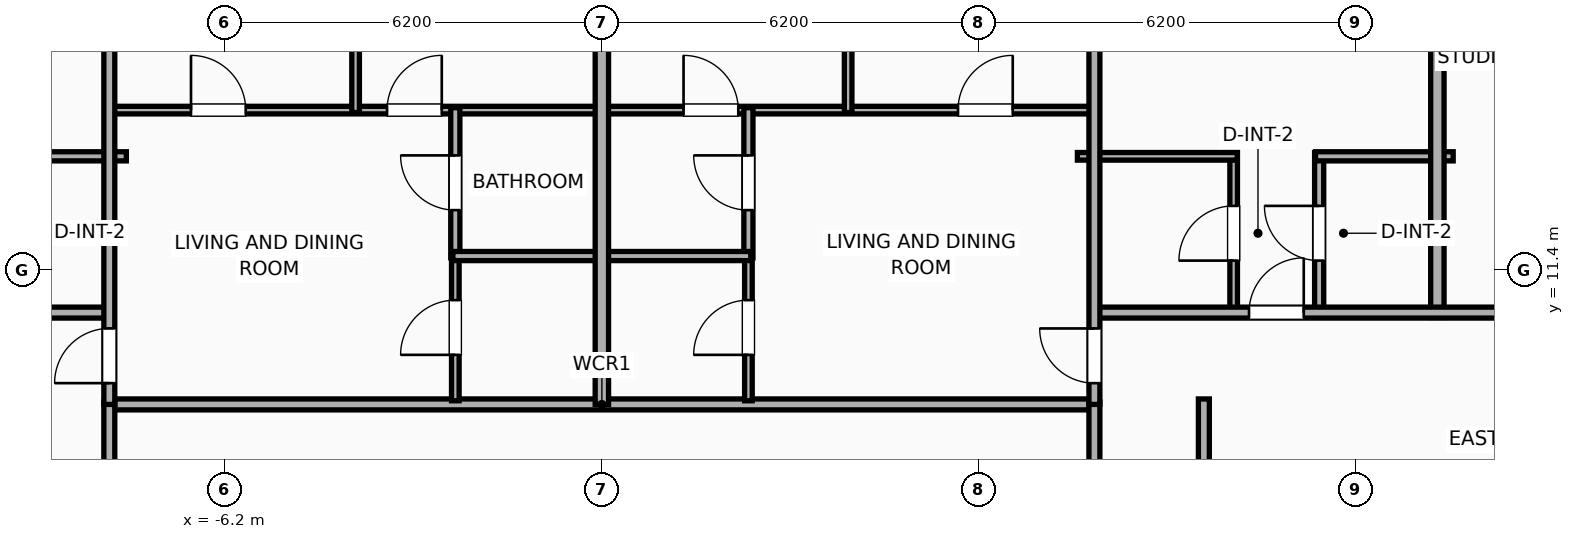
"""IFC4 building model, lengths in metres.
Left out: names, types, materials, properties, quantities, classifications, styles, units other than length and angle.
Written with IfcOpenShell. Run it as: python <this file> out.ifc"""

import sys

from ifc_helpers import new_model, si_unit, direction, frame, frame_2d, origin, place, context, subcontext, project, spatial, rectangle, extrude, element, fill, save


model = new_model("IFC4")
c1 = context("Model", 3, precision=1e-05, world=origin(), true_north=direction((0.0, 1.0)))
c2 = subcontext(c1, "Body", "Model", "MODEL_VIEW")
j1 = project(units=[si_unit("LENGTHUNIT", "METRE"), si_unit("PLANEANGLEUNIT", "RADIAN")], contexts=[c1])
p1 = place(None, origin())
s1 = spatial("IfcSite", under=j1, at=p1, CompositionType="ELEMENT")
p2 = place(p1, origin())
s2 = spatial("IfcBuilding", under=s1, at=p2, CompositionType="ELEMENT")
p3 = place(p2, frame((0.0, 0.0, 148.2)))
s3 = spatial("IfcBuildingStorey", under=s2, at=p3, CompositionType="ELEMENT", Elevation=148.2)
p4 = place(p3, frame((9.9, -9.28, 0.0), z_axis=(0.0, 0.0, 1.0), x_axis=(0.0, 1.0, 0.0)))
e1 = element("IfcWall", 1, at=p4, inside=s3, PredefinedType="PARTITIONING", context=c2, shape_type="SweptSolid", body=[
    extrude(rectangle(XDim=18.56, YDim=0.18, at=frame_2d((9.28, 0.0))), origin(), (0.0, 0.0, 1.0), 3.65),
])
p5 = place(p4, frame((7.802, 0.0, 0.0)))
e2 = element("IfcOpeningElement", 2, at=p5, cuts=e1, PredefinedType="OPENING", context=c2, shape_type="SweptSolid", body=[
    extrude(rectangle(XDim=1.1, YDim=2.05, at=frame_2d((0.55, 1.025))), frame((0.0, 0.1, 0.0), z_axis=(0.0, -1.0, 0.0), x_axis=(1.0, 0.0, 0.0)), (0.0, 0.0, 1.0), 0.2),
])
p6 = place(p3, frame((-8.15, 9.19, 0.0), z_axis=(0.0, 0.0, 1.0), x_axis=(1.0, 0.0, 0.0)))
e3 = element("IfcWall", 3, at=p6, inside=s3, PredefinedType="PARTITIONING", context=c2, shape_type="SweptSolid", body=[
    extrude(rectangle(XDim=16.3, YDim=0.18, at=frame_2d((8.15, 0.0))), origin(), (0.0, 0.0, 1.0), 3.65),
])
for number, where, z_axis, x_axis in (
    (4, (-8.1, 0.92, 0.0), (0.0, 0.0, 1.0), (0.0, 1.0, 0.0)),
    (5, (8.1, 0.92, 0.0), (0.0, 0.0, 1.0), (0.0, 1.0, 0.0)),
):
    element("IfcWall", number, at=place(p3, frame(where, z_axis=z_axis, x_axis=x_axis)), inside=s3, PredefinedType="PARTITIONING", context=c2, shape_type="SweptSolid", body=[
        extrude(rectangle(XDim=8.31, YDim=0.18, at=frame_2d((4.155, 0.0))), origin(), (0.0, 0.0, 1.0), 3.65),
    ])
p7 = place(p3, frame((-10.084, 13.27, 0.0), z_axis=(0.0, 0.0, 1.0), x_axis=(1.0, 0.0, 0.0)))
e6 = element("IfcWall", 6, at=p7, inside=s3, PredefinedType="PLUMBINGWALL", context=c2, shape_type="SweptSolid", body=[
    extrude(rectangle(XDim=2.264, YDim=0.15, at=frame_2d((1.132, 0.0))), origin(), (0.0, 0.0, 1.0), 3.65),
])
p8 = place(p3, frame((10.39, 10.68, 0.0), z_axis=(0.0, 0.0, 1.0), x_axis=(0.0, 1.0, 0.0)))
e7 = element("IfcWall", 7, at=p8, inside=s3, PredefinedType="PARTITIONING", context=c2, shape_type="SweptSolid", body=[
    extrude(rectangle(XDim=2.65, YDim=0.125, at=frame_2d((1.325, 0.0))), origin(), (0.0, 0.0, 1.0), 3.65),
])
p9 = place(p8, frame((0.875, 0.0, 0.0)))
e8 = element("IfcOpeningElement", 8, at=p9, cuts=e7, PredefinedType="OPENING", context=c2, shape_type="SweptSolid", body=[
    extrude(rectangle(XDim=0.9, YDim=2.05, at=frame_2d((0.45, 1.025))), frame((0.0, 0.073, 0.0), z_axis=(0.0, -1.0, 0.0), x_axis=(1.0, 0.0, 0.0)), (0.0, 0.0, 1.0), 0.145),
])
p10 = place(p3, frame((11.796, 10.68, 0.0), z_axis=(0.0, 0.0, 1.0), x_axis=(0.0, 1.0, 0.0)))
e9 = element("IfcWall", 9, at=p10, inside=s3, PredefinedType="PLUMBINGWALL", context=c2, shape_type="SweptSolid", body=[
    extrude(rectangle(XDim=2.65, YDim=0.15, at=frame_2d((1.325, 0.0))), origin(), (0.0, 0.0, 1.0), 3.04),
])
p11 = place(p10, frame((0.875, 0.0, 0.0)))
e10 = element("IfcOpeningElement", 10, at=p11, cuts=e9, PredefinedType="OPENING", context=c2, shape_type="SweptSolid", body=[
    extrude(rectangle(XDim=0.9, YDim=2.05, at=frame_2d((0.45, 1.025))), frame((0.0, 0.085, 0.0), z_axis=(0.0, -1.0, 0.0), x_axis=(1.0, 0.0, 0.0)), (0.0, 0.0, 1.0), 0.17),
])
p12 = place(p3, frame((7.82, 13.27, 0.0), z_axis=(0.0, 0.0, 1.0), x_axis=(1.0, 0.0, 0.0)))
e11 = element("IfcWall", 11, at=p12, inside=s3, PredefinedType="PARTITIONING", context=c2, shape_type="SweptSolid", body=[
    extrude(rectangle(XDim=2.63, YDim=0.125, at=frame_2d((1.315, 0.0))), origin(), (0.0, 0.0, 1.0), 3.65),
])
p13 = place(p3, frame((11.736, 13.27, 0.0), z_axis=(0.0, 0.0, 1.0), x_axis=(1.0, 0.0, 0.0)))
e12 = element("IfcWall", 12, at=p13, inside=s3, PredefinedType="PLUMBINGWALL", context=c2, shape_type="SweptSolid", body=[
    extrude(rectangle(XDim=2.264, YDim=0.15, at=frame_2d((1.132, 0.0))), origin(), (0.0, 0.0, 1.0), 3.65),
])
p14 = place(p3, frame((13.74, 10.62, 0.0), z_axis=(0.0, 0.0, 1.0), x_axis=(0.0, 1.0, 0.0)))
e13 = element("IfcWall", 13, at=p14, inside=s3, PredefinedType="PARTITIONING", context=c2, shape_type="SweptSolid", body=[
    extrude(rectangle(XDim=10.902, YDim=0.22, at=frame_2d((5.451, 0.0))), origin(), (0.0, 0.0, 1.0), 3.65),
])
p15 = place(p3, frame((-19.5, 10.7, 0.0), z_axis=(0.0, 0.0, 1.0), x_axis=(1.0, 0.0, 0.0)))
e14 = element("IfcWall", 14, at=p15, inside=s3, PredefinedType="PARTITIONING", context=c2, shape_type="SweptSolid", body=[
    extrude(rectangle(XDim=11.42, YDim=0.18, at=frame_2d((5.71, 0.0))), origin(), (0.0, 0.0, 1.0), 3.65),
])
p16 = place(p15, frame((3.464, 0.0, 0.0)))
e15 = element("IfcOpeningElement", 15, at=p16, cuts=e14, PredefinedType="OPENING", context=c2, shape_type="SweptSolid", body=[
    extrude(rectangle(XDim=1.15, YDim=2.05, at=frame_2d((0.575, 1.025))), frame((0.0, 0.1, 0.0), z_axis=(0.0, -1.0, 0.0), x_axis=(1.0, 0.0, 0.0)), (0.0, 0.0, 1.0), 0.2),
])
p17 = place(p15, frame((8.323, 0.0, 0.0)))
e16 = element("IfcOpeningElement", 16, at=p17, cuts=e14, PredefinedType="OPENING", context=c2, shape_type="SweptSolid", body=[
    extrude(rectangle(XDim=0.9, YDim=2.05, at=frame_2d((0.45, 1.025))), frame((0.0, 0.1, 0.0), z_axis=(0.0, -1.0, 0.0), x_axis=(1.0, 0.0, 0.0)), (0.0, 0.0, 1.0), 0.2),
])
p18 = place(p3, frame((8.08, 10.7, 0.0), z_axis=(0.0, 0.0, 1.0), x_axis=(1.0, 0.0, 0.0)))
e17 = element("IfcWall", 17, at=p18, inside=s3, PredefinedType="PARTITIONING", context=c2, shape_type="SweptSolid", body=[
    extrude(rectangle(XDim=11.42, YDim=0.18, at=frame_2d((5.71, 0.0))), origin(), (0.0, 0.0, 1.0), 3.65),
])
p19 = place(p18, frame((2.562, 0.0, 0.0)))
e18 = element("IfcOpeningElement", 18, at=p19, cuts=e17, PredefinedType="OPENING", context=c2, shape_type="SweptSolid", body=[
    extrude(rectangle(XDim=0.9, YDim=2.05, at=frame_2d((0.45, 1.025))), frame((0.0, 0.1, 0.0), z_axis=(0.0, -1.0, 0.0), x_axis=(1.0, 0.0, 0.0)), (0.0, 0.0, 1.0), 0.2),
])
p20 = place(p18, frame((6.853, 0.0, 0.0)))
e19 = element("IfcOpeningElement", 19, at=p20, cuts=e17, PredefinedType="OPENING", context=c2, shape_type="SweptSolid", body=[
    extrude(rectangle(XDim=1.15, YDim=2.05, at=frame_2d((0.575, 1.025))), frame((0.0, 0.1, 0.0), z_axis=(0.0, -1.0, 0.0), x_axis=(1.0, 0.0, 0.0)), (0.0, 0.0, 1.0), 0.2),
])
p21 = place(p3, frame((-8.08, 14.03, 0.0), z_axis=(0.0, 0.0, 1.0), x_axis=(1.0, 0.0, 0.0)))
e20 = element("IfcWall", 20, at=p21, inside=s3, PredefinedType="PARTITIONING", context=c2, shape_type="SweptSolid", body=[
    extrude(rectangle(XDim=8.06, YDim=0.125, at=frame_2d((4.03, 0.0))), origin(), (0.0, 0.0, 1.0), 3.65),
])
p22 = place(p21, frame((1.323, 0.0, 0.0)))
e21 = element("IfcOpeningElement", 21, at=p22, cuts=e20, PredefinedType="OPENING", context=c2, shape_type="SweptSolid", body=[
    extrude(rectangle(XDim=0.9, YDim=2.05, at=frame_2d((0.45, 1.025))), frame((0.0, 0.073, 0.0), z_axis=(0.0, -1.0, 0.0), x_axis=(1.0, 0.0, 0.0)), (0.0, 0.0, 1.0), 0.145),
])
p23 = place(p21, frame((4.547, 0.0, 0.0)))
e22 = element("IfcOpeningElement", 22, at=p23, cuts=e20, PredefinedType="OPENING", context=c2, shape_type="SweptSolid", body=[
    extrude(rectangle(XDim=0.9, YDim=2.05, at=frame_2d((0.45, 1.025))), frame((0.0, 0.073, 0.0), z_axis=(0.0, -1.0, 0.0), x_axis=(1.0, 0.0, 0.0)), (0.0, 0.0, 1.0), 0.145),
])
p24 = place(p3, frame((-2.41, 9.25, 0.0), z_axis=(0.0, 0.0, 1.0), x_axis=(0.0, 1.0, 0.0)))
e23 = element("IfcWall", 23, at=p24, inside=s3, PredefinedType="PARTITIONING", context=c2, shape_type="SweptSolid", body=[
    extrude(rectangle(XDim=2.41, YDim=0.125, at=frame_2d((1.205, 0.0))), origin(), (0.0, 0.0, 1.0), 3.65),
])
p25 = place(p24, frame((0.755, 0.0, 0.0)))
e24 = element("IfcOpeningElement", 24, at=p25, cuts=e23, PredefinedType="OPENING", context=c2, shape_type="SweptSolid", body=[
    extrude(rectangle(XDim=0.9, YDim=2.05, at=frame_2d((0.45, 1.025))), frame((0.0, 0.073, 0.0), z_axis=(0.0, -1.0, 0.0), x_axis=(1.0, 0.0, 0.0)), (0.0, 0.0, 1.0), 0.145),
])
p26 = place(p3, frame((-2.41, 11.6, 0.0), z_axis=(0.0, 0.0, 1.0), x_axis=(0.0, 1.0, 0.0)))
e25 = element("IfcWall", 25, at=p26, inside=s3, PredefinedType="PLUMBINGWALL", context=c2, shape_type="SweptSolid", body=[
    extrude(rectangle(XDim=2.47, YDim=0.15, at=frame_2d((1.235, 0.0))), origin(), (0.0, 0.0, 1.0), 3.04),
])
p27 = place(p26, frame((0.785, 0.0, 0.0)))
e26 = element("IfcOpeningElement", 26, at=p27, cuts=e25, PredefinedType="OPENING", context=c2, shape_type="SweptSolid", body=[
    extrude(rectangle(XDim=0.9, YDim=2.05, at=frame_2d((0.45, 1.025))), frame((0.0, 0.085, 0.0), z_axis=(0.0, -1.0, 0.0), x_axis=(1.0, 0.0, 0.0)), (0.0, 0.0, 1.0), 0.17),
])
p28 = place(p3, frame((-2.45, 11.63, 0.0), z_axis=(0.0, 0.0, 1.0), x_axis=(1.0, 0.0, 0.0)))
e27 = element("IfcWall", 27, at=p28, inside=s3, PredefinedType="PLUMBINGWALL", context=c2, shape_type="SweptSolid", body=[
    extrude(rectangle(XDim=2.43, YDim=0.15, at=frame_2d((1.215, 0.0))), origin(), (0.0, 0.0, 1.0), 3.65),
])
p29 = place(p3, frame((-4.05, 13.99, 0.0), z_axis=(0.0, 0.0, 1.0), x_axis=(0.0, 1.0, 0.0)))
e28 = element("IfcWall", 28, at=p29, inside=s3, PredefinedType="PARTITIONING", context=c2, shape_type="SweptSolid", body=[
    extrude(rectangle(XDim=5.662, YDim=0.125, at=frame_2d((2.831, 0.0))), origin(), (0.0, 0.0, 1.0), 3.65),
])
p30 = place(p3, frame((-8.1, 9.19, 0.0), z_axis=(0.0, 0.0, 1.0), x_axis=(0.0, 1.0, 0.0)))
e29 = element("IfcWall", 29, at=p30, inside=s3, PredefinedType="PARTITIONING", context=c2, shape_type="SweptSolid", body=[
    extrude(rectangle(XDim=10.036, YDim=0.18, at=frame_2d((5.018, 0.0))), origin(), (0.0, 0.0, 1.0), 3.65),
])
p31 = place(p30, frame((0.35, 0.0, 0.0)))
e30 = element("IfcOpeningElement", 30, at=p31, cuts=e29, PredefinedType="OPENING", context=c2, shape_type="SweptSolid", body=[
    extrude(rectangle(XDim=0.9, YDim=2.05, at=frame_2d((0.45, 1.025))), frame((0.0, 0.1, 0.0), z_axis=(0.0, -1.0, 0.0), x_axis=(1.0, 0.0, 0.0)), (0.0, 0.0, 1.0), 0.2),
])
p32 = place(p3, frame((0.02, 14.03, 0.0), z_axis=(0.0, 0.0, 1.0), x_axis=(1.0, 0.0, 0.0)))
e31 = element("IfcWall", 31, at=p32, inside=s3, PredefinedType="PARTITIONING", context=c2, shape_type="SweptSolid", body=[
    extrude(rectangle(XDim=8.06, YDim=0.125, at=frame_2d((4.03, 0.0))), origin(), (0.0, 0.0, 1.0), 3.65),
])
p33 = place(p32, frame((1.323, 0.0, 0.0)))
e32 = element("IfcOpeningElement", 32, at=p33, cuts=e31, PredefinedType="OPENING", context=c2, shape_type="SweptSolid", body=[
    extrude(rectangle(XDim=0.9, YDim=2.05, at=frame_2d((0.45, 1.025))), frame((0.0, 0.073, 0.0), z_axis=(0.0, -1.0, 0.0), x_axis=(1.0, 0.0, 0.0)), (0.0, 0.0, 1.0), 0.145),
])
p34 = place(p32, frame((5.837, 0.0, 0.0)))
e33 = element("IfcOpeningElement", 33, at=p34, cuts=e31, PredefinedType="OPENING", context=c2, shape_type="SweptSolid", body=[
    extrude(rectangle(XDim=0.9, YDim=2.05, at=frame_2d((0.45, 1.025))), frame((0.0, 0.073, 0.0), z_axis=(0.0, -1.0, 0.0), x_axis=(1.0, 0.0, 0.0)), (0.0, 0.0, 1.0), 0.145),
])
p35 = place(p3, frame((2.41, 9.25, 0.0), z_axis=(0.0, 0.0, 1.0), x_axis=(0.0, 1.0, 0.0)))
e34 = element("IfcWall", 34, at=p35, inside=s3, PredefinedType="PARTITIONING", context=c2, shape_type="SweptSolid", body=[
    extrude(rectangle(XDim=2.41, YDim=0.125, at=frame_2d((1.205, 0.0))), origin(), (0.0, 0.0, 1.0), 3.65),
])
p36 = place(p35, frame((0.755, 0.0, 0.0)))
e35 = element("IfcOpeningElement", 35, at=p36, cuts=e34, PredefinedType="OPENING", context=c2, shape_type="SweptSolid", body=[
    extrude(rectangle(XDim=0.9, YDim=2.05, at=frame_2d((0.45, 1.025))), frame((0.0, 0.073, 0.0), z_axis=(0.0, -1.0, 0.0), x_axis=(1.0, 0.0, 0.0)), (0.0, 0.0, 1.0), 0.145),
])
p37 = place(p3, frame((2.41, 11.6, 0.0), z_axis=(0.0, 0.0, 1.0), x_axis=(0.0, 1.0, 0.0)))
e36 = element("IfcWall", 36, at=p37, inside=s3, PredefinedType="PLUMBINGWALL", context=c2, shape_type="SweptSolid", body=[
    extrude(rectangle(XDim=2.47, YDim=0.15, at=frame_2d((1.235, 0.0))), origin(), (0.0, 0.0, 1.0), 3.65),
])
p38 = place(p37, frame((0.785, 0.0, 0.0)))
e37 = element("IfcOpeningElement", 37, at=p38, cuts=e36, PredefinedType="OPENING", context=c2, shape_type="SweptSolid", body=[
    extrude(rectangle(XDim=0.9, YDim=2.05, at=frame_2d((0.45, 1.025))), frame((0.0, 0.085, 0.0), z_axis=(0.0, -1.0, 0.0), x_axis=(1.0, 0.0, 0.0)), (0.0, 0.0, 1.0), 0.17),
])
p39 = place(p3, frame((0.02, 11.63, 0.0), z_axis=(0.0, 0.0, 1.0), x_axis=(1.0, 0.0, 0.0)))
e38 = element("IfcWall", 38, at=p39, inside=s3, PredefinedType="PLUMBINGWALL", context=c2, shape_type="SweptSolid", body=[
    extrude(rectangle(XDim=2.43, YDim=0.15, at=frame_2d((1.215, 0.0))), origin(), (0.0, 0.0, 1.0), 3.65),
])
p40 = place(p3, frame((4.05, 13.99, 0.0), z_axis=(0.0, 0.0, 1.0), x_axis=(0.0, 1.0, 0.0)))
e39 = element("IfcWall", 39, at=p40, inside=s3, PredefinedType="PARTITIONING", context=c2, shape_type="SweptSolid", body=[
    extrude(rectangle(XDim=6.513, YDim=0.125, at=frame_2d((3.257, 0.0))), origin(), (0.0, 0.0, 1.0), 3.65),
])
p41 = place(p3, frame((8.1, 9.19, 0.0), z_axis=(0.0, 0.0, 1.0), x_axis=(0.0, 1.0, 0.0)))
e40 = element("IfcWall", 40, at=p41, inside=s3, PredefinedType="PARTITIONING", context=c2, shape_type="SweptSolid", body=[
    extrude(rectangle(XDim=11.739, YDim=0.18, at=frame_2d((5.87, 0.0))), origin(), (0.0, 0.0, 1.0), 3.65),
])
p42 = place(p41, frame((0.349, 0.0, 0.0)))
e41 = element("IfcOpeningElement", 41, at=p42, cuts=e40, PredefinedType="OPENING", context=c2, shape_type="SweptSolid", body=[
    extrude(rectangle(XDim=0.9, YDim=2.05, at=frame_2d((0.45, 1.025))), frame((0.0, 0.1, 0.0), z_axis=(0.0, -1.0, 0.0), x_axis=(1.0, 0.0, 0.0)), (0.0, 0.0, 1.0), 0.2),
])
p43 = place(p3, frame((0.0, 9.19, 0.0), z_axis=(0.0, 0.0, 1.0), x_axis=(0.0, 1.0, 0.0)))
e42 = element("IfcWall", 42, at=p43, inside=s3, PredefinedType="PARTITIONING", context=c2, shape_type="SweptSolid", body=[
    extrude(rectangle(XDim=10.888, YDim=0.22, at=frame_2d((5.444, 0.0))), origin(), (0.0, 0.0, 1.0), 3.04),
])
p44 = place(p9, origin())
e43 = element("IfcDoor", 43, at=p44, inside=s3, OperationType="SINGLE_SWING_LEFT", PredefinedType="DOOR", context=c2, shape_type="SweptSolid", body=[
    extrude(rectangle(XDim=0.9, YDim=2.05, at=frame_2d((0.45, 1.025))), frame((0.0, 0.025, 0.0), z_axis=(0.0, -1.0, 0.0), x_axis=(1.0, 0.0, 0.0)), (0.0, 0.0, 1.0), 0.05),
])
fill(e8, e43)
p45 = place(p11, origin())
e44 = element("IfcDoor", 44, at=p45, inside=s3, OperationType="SINGLE_SWING_RIGHT", PredefinedType="DOOR", context=c2, shape_type="SweptSolid", body=[
    extrude(rectangle(XDim=0.9, YDim=2.05, at=frame_2d((0.45, 1.025))), frame((0.0, 0.025, 0.0), z_axis=(0.0, -1.0, 0.0), x_axis=(1.0, 0.0, 0.0)), (0.0, 0.0, 1.0), 0.05),
])
fill(e10, e44)
p46 = place(p19, origin())
e45 = element("IfcDoor", 45, at=p46, inside=s3, OperationType="SINGLE_SWING_RIGHT", PredefinedType="DOOR", context=c2, shape_type="SweptSolid", body=[
    extrude(rectangle(XDim=0.9, YDim=2.05, at=frame_2d((0.45, 1.025))), frame((0.0, 0.025, 0.0), z_axis=(0.0, -1.0, 0.0), x_axis=(1.0, 0.0, 0.0)), (0.0, 0.0, 1.0), 0.05),
])
fill(e18, e45)
p47 = place(p22, origin())
e46 = element("IfcDoor", 46, at=p47, inside=s3, OperationType="SINGLE_SWING_LEFT", PredefinedType="DOOR", context=c2, shape_type="SweptSolid", body=[
    extrude(rectangle(XDim=0.9, YDim=2.05, at=frame_2d((0.45, 1.025))), frame((0.0, 0.025, 0.0), z_axis=(0.0, -1.0, 0.0), x_axis=(1.0, 0.0, 0.0)), (0.0, 0.0, 1.0), 0.05),
])
fill(e21, e46)
p48 = place(p23, origin())
e47 = element("IfcDoor", 47, at=p48, inside=s3, OperationType="SINGLE_SWING_RIGHT", PredefinedType="DOOR", context=c2, shape_type="SweptSolid", body=[
    extrude(rectangle(XDim=0.9, YDim=2.05, at=frame_2d((0.45, 1.025))), frame((0.0, 0.025, 0.0), z_axis=(0.0, -1.0, 0.0), x_axis=(1.0, 0.0, 0.0)), (0.0, 0.0, 1.0), 0.05),
])
fill(e22, e47)
p49 = place(p25, origin())
e48 = element("IfcDoor", 48, at=p49, inside=s3, OperationType="SINGLE_SWING_LEFT", PredefinedType="DOOR", context=c2, shape_type="SweptSolid", body=[
    extrude(rectangle(XDim=0.9, YDim=2.05, at=frame_2d((0.45, 1.025))), frame((0.0, 0.025, 0.0), z_axis=(0.0, -1.0, 0.0), x_axis=(1.0, 0.0, 0.0)), (0.0, 0.0, 1.0), 0.05),
])
fill(e24, e48)
p50 = place(p27, origin())
e49 = element("IfcDoor", 49, at=p50, inside=s3, OperationType="SINGLE_SWING_RIGHT", PredefinedType="DOOR", context=c2, shape_type="SweptSolid", body=[
    extrude(rectangle(XDim=0.9, YDim=2.05, at=frame_2d((0.45, 1.025))), frame((0.0, 0.025, 0.0), z_axis=(0.0, -1.0, 0.0), x_axis=(1.0, 0.0, 0.0)), (0.0, 0.0, 1.0), 0.05),
])
fill(e26, e49)
p51 = place(p31, origin())
e50 = element("IfcDoor", 50, at=p51, inside=s3, OperationType="SINGLE_SWING_LEFT", PredefinedType="DOOR", context=c2, shape_type="SweptSolid", body=[
    extrude(rectangle(XDim=0.9, YDim=2.05, at=frame_2d((0.45, 1.025))), frame((0.0, 0.025, 0.0), z_axis=(0.0, -1.0, 0.0), x_axis=(1.0, 0.0, 0.0)), (0.0, 0.0, 1.0), 0.05),
])
fill(e30, e50)
p52 = place(p33, origin())
e51 = element("IfcDoor", 51, at=p52, inside=s3, OperationType="SINGLE_SWING_LEFT", PredefinedType="DOOR", context=c2, shape_type="SweptSolid", body=[
    extrude(rectangle(XDim=0.9, YDim=2.05, at=frame_2d((0.45, 1.025))), frame((0.0, 0.025, 0.0), z_axis=(0.0, -1.0, 0.0), x_axis=(1.0, 0.0, 0.0)), (0.0, 0.0, 1.0), 0.05),
])
fill(e32, e51)
p53 = place(p34, origin())
e52 = element("IfcDoor", 52, at=p53, inside=s3, OperationType="SINGLE_SWING_RIGHT", PredefinedType="DOOR", context=c2, shape_type="SweptSolid", body=[
    extrude(rectangle(XDim=0.9, YDim=2.05, at=frame_2d((0.45, 1.025))), frame((0.0, 0.025, 0.0), z_axis=(0.0, -1.0, 0.0), x_axis=(1.0, 0.0, 0.0)), (0.0, 0.0, 1.0), 0.05),
])
fill(e33, e52)
p54 = place(p36, origin())
e53 = element("IfcDoor", 53, at=p54, inside=s3, OperationType="SINGLE_SWING_LEFT", PredefinedType="DOOR", context=c2, shape_type="SweptSolid", body=[
    extrude(rectangle(XDim=0.9, YDim=2.05, at=frame_2d((0.45, 1.025))), frame((0.0, 0.025, 0.0), z_axis=(0.0, -1.0, 0.0), x_axis=(1.0, 0.0, 0.0)), (0.0, 0.0, 1.0), 0.05),
])
fill(e35, e53)
p55 = place(p38, origin())
e54 = element("IfcDoor", 54, at=p55, inside=s3, OperationType="SINGLE_SWING_RIGHT", PredefinedType="DOOR", context=c2, shape_type="SweptSolid", body=[
    extrude(rectangle(XDim=0.9, YDim=2.05, at=frame_2d((0.45, 1.025))), frame((0.0, 0.025, 0.0), z_axis=(0.0, -1.0, 0.0), x_axis=(1.0, 0.0, 0.0)), (0.0, 0.0, 1.0), 0.05),
])
fill(e37, e54)
p56 = place(p42, origin())
e55 = element("IfcDoor", 55, at=p56, inside=s3, OperationType="SINGLE_SWING_RIGHT", PredefinedType="DOOR", context=c2, shape_type="SweptSolid", body=[
    extrude(rectangle(XDim=0.9, YDim=2.05, at=frame_2d((0.45, 1.025))), frame((0.0, 0.025, 0.0), z_axis=(0.0, -1.0, 0.0), x_axis=(1.0, 0.0, 0.0)), (0.0, 0.0, 1.0), 0.05),
])
fill(e41, e55)
save(model, sys.argv[1])
